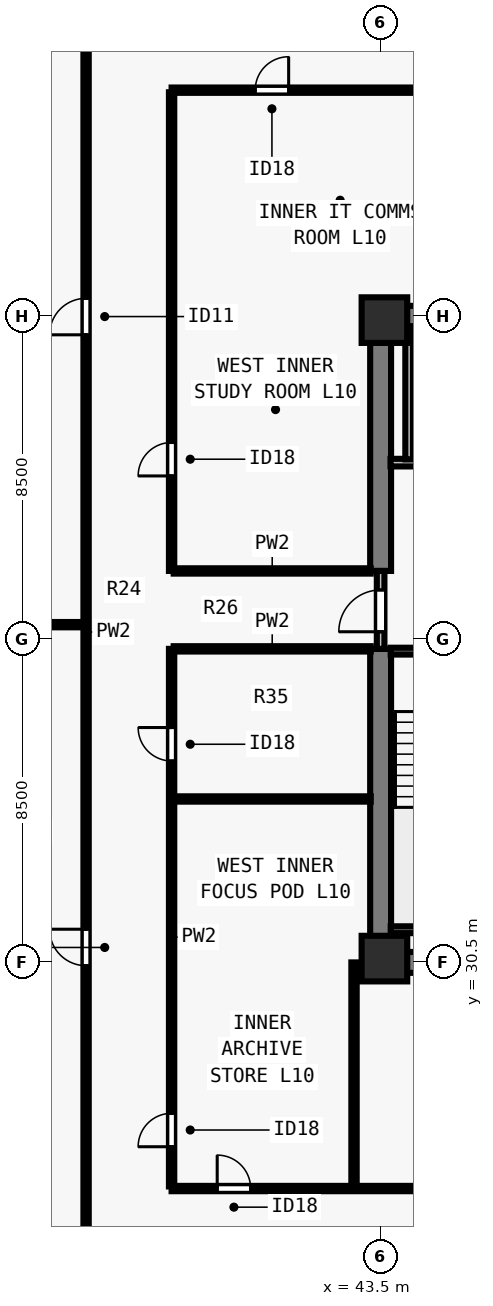
"""IFC4 building model, lengths in metres.
Left out: names, types, materials, properties, quantities, classifications, styles, units other than length and angle.
Written with IfcOpenShell. Run it as: python <this file> out.ifc"""

import sys

from ifc_helpers import new_model, si_unit, direction, frame, frame_2d, origin, origin_2d, place, context, subcontext, project, spatial, rectangle, extrude, element, fill, save


model = new_model("IFC4")
c1 = context("Model", 3, precision=1e-05, world=origin(), true_north=direction((0.0, 1.0)))
c2 = subcontext(c1, "Body", "Model", "MODEL_VIEW")
j1 = project(units=[si_unit("LENGTHUNIT", "METRE"), si_unit("PLANEANGLEUNIT", "RADIAN")], contexts=[c1])
p1 = place(None, origin())
s1 = spatial("IfcSite", under=j1, at=p1, CompositionType="ELEMENT")
p2 = place(p1, origin())
s2 = spatial("IfcBuilding", under=s1, at=p2, CompositionType="ELEMENT")
p3 = place(p2, frame((0.0, 0.0, 41.0)))
s3 = spatial("IfcBuildingStorey", under=s2, at=p3, CompositionType="ELEMENT", Elevation=41.0)
for number, where, z_axis, x_axis in (
    (1, (43.6, 30.6, 0.0), (0.0, 0.0, 1.0), (1.0, 0.0, 0.0)),
    (2, (43.6, 47.4, 0.0), (0.0, 0.0, 1.0), (1.0, 0.0, 0.0)),
):
    element("IfcColumn", number, at=place(p3, frame(where, z_axis=z_axis, x_axis=x_axis)), inside=s3, PredefinedType="COLUMN", context=c2, shape_type="SweptSolid", body=[
        extrude(rectangle(XDim=1.2, YDim=1.2, at=origin_2d()), origin(), (0.0, 0.0, 1.0), 3.5),
    ])
for number, where, z_axis, x_axis in (
    (3, (43.225, 30.5, 0.0), (0.0, 0.0, 1.0), (1.0, 0.0, 0.0)),
    (4, (43.225, 47.5, 0.0), (0.0, 0.0, 1.0), (1.0, 0.0, 0.0)),
):
    element("IfcWall", number, at=place(p3, frame(where, z_axis=z_axis, x_axis=x_axis)), inside=s3, PredefinedType="SHEAR", context=c2, shape_type="SweptSolid", body=[
        extrude(rectangle(XDim=17.55, YDim=0.55, at=frame_2d((8.775, 0.0))), origin(), (0.0, 0.0, 1.0), 3.28),
    ])
p4 = place(p3, frame((43.5, 30.765, 0.0), z_axis=(0.0, 0.0, 1.0), x_axis=(0.0, 1.0, 0.0)))
e5 = element("IfcWall", 5, at=p4, inside=s3, PredefinedType="SHEAR", context=c2, shape_type="SweptSolid", body=[
    extrude(rectangle(XDim=7.985, YDim=0.55, at=frame_2d((3.993, 0.0))), origin(), (0.0, 0.0, 1.0), 3.28),
])
p5 = place(p3, frame((43.5, 40.8, 0.0), z_axis=(0.0, 0.0, 1.0), x_axis=(0.0, 1.0, 0.0)))
e6 = element("IfcWall", 6, at=p5, inside=s3, PredefinedType="SHEAR", context=c2, shape_type="SweptSolid", body=[
    extrude(rectangle(XDim=6.435, YDim=0.55, at=frame_2d((3.218, 0.0))), origin(), (0.0, 0.0, 1.0), 3.28),
])
p6 = place(p3, frame((43.5, 38.75, 0.0), z_axis=(0.0, 0.0, 1.0), x_axis=(0.0, 1.0, 0.0)))
e7 = element("IfcWall", 7, at=p6, inside=s3, PredefinedType="SOLIDWALL", context=c2, shape_type="SweptSolid", body=[
    extrude(rectangle(XDim=2.05, YDim=0.2, at=frame_2d((1.025, 0.0))), origin(), (0.0, 0.0, 1.0), 3.28),
])
p7 = place(p6, frame((0.45, 0.0, 0.0)))
e8 = element("IfcOpeningElement", 8, at=p7, cuts=e7, PredefinedType="OPENING", context=c2, shape_type="SweptSolid", body=[
    extrude(rectangle(XDim=1.1, YDim=2.15, at=frame_2d((0.55, 1.075))), frame((0.0, 0.11, 0.0), z_axis=(0.0, -1.0, 0.0), x_axis=(1.0, 0.0, 0.0)), (0.0, 0.0, 1.0), 0.22),
])
p8 = place(p3, frame((43.76, 43.65, 0.0), z_axis=(0.0, 0.0, 1.0), x_axis=(1.0, 0.0, 0.0)))
e9 = element("IfcWall", 9, at=p8, inside=s3, PredefinedType="SOLIDWALL", context=c2, shape_type="SweptSolid", body=[
    extrude(rectangle(XDim=3.505, YDim=0.2, at=frame_2d((1.752, 0.0))), origin(), (0.0, 0.0, 1.0), 3.28),
])
p9 = place(p8, frame((1.11, 0.0, 0.0)))
e10 = element("IfcOpeningElement", 10, at=p9, cuts=e9, PredefinedType="OPENING", context=c2, shape_type="SweptSolid", body=[
    extrude(rectangle(XDim=1.1, YDim=2.2, at=frame_2d((0.55, 1.1))), frame((0.0, 0.11, 0.0), z_axis=(0.0, -1.0, 0.0), x_axis=(1.0, 0.0, 0.0)), (0.0, 0.0, 1.0), 0.22),
])
p10 = place(p3, frame((44.25, 43.735, 0.0), z_axis=(0.0, 0.0, 1.0), x_axis=(0.0, 1.0, 0.0)))
e11 = element("IfcWall", 11, at=p10, inside=s3, PredefinedType="SOLIDWALL", context=c2, shape_type="SweptSolid", body=[
    extrude(rectangle(XDim=3.505, YDim=0.2, at=frame_2d((1.752, 0.0))), origin(), (0.0, 0.0, 1.0), 3.28),
])
p11 = place(p3, frame((35.75, 22.355, 0.0), z_axis=(0.0, 0.0, 1.0), x_axis=(0.0, 1.0, 0.0)))
e12 = element("IfcWall", 12, at=p11, inside=s3, PredefinedType="PARTITIONING", context=c2, shape_type="SweptSolid", body=[
    extrude(rectangle(XDim=33.29, YDim=0.14, at=frame_2d((16.645, 0.0))), origin(), (0.0, 0.0, 1.0), 3.28),
])
p12 = place(p11, frame((8.058, 0.0, 0.0)))
e13 = element("IfcOpeningElement", 13, at=p12, cuts=e12, PredefinedType="OPENING", context=c2, shape_type="SweptSolid", body=[
    extrude(rectangle(XDim=0.96, YDim=2.12, at=frame_2d((0.48, 1.06))), frame((0.0, 0.08, 0.0), z_axis=(0.0, -1.0, 0.0), x_axis=(1.0, 0.0, 0.0)), (0.0, 0.0, 1.0), 0.16),
])
p13 = place(p11, frame((24.658, 0.0, 0.0)))
e14 = element("IfcOpeningElement", 14, at=p13, cuts=e12, PredefinedType="OPENING", context=c2, shape_type="SweptSolid", body=[
    extrude(rectangle(XDim=0.96, YDim=2.12, at=frame_2d((0.48, 1.06))), frame((0.0, 0.08, 0.0), z_axis=(0.0, -1.0, 0.0), x_axis=(1.0, 0.0, 0.0)), (0.0, 0.0, 1.0), 0.16),
])
p14 = place(p3, frame((38.0, 24.55, 0.0), z_axis=(0.0, 0.0, 1.0), x_axis=(1.0, 0.0, 0.0)))
e15 = element("IfcWall", 15, at=p14, inside=s3, PredefinedType="PARTITIONING", context=c2, shape_type="SweptSolid", body=[
    extrude(rectangle(XDim=28.0, YDim=0.14, at=frame_2d((14.0, 0.0))), origin(), (0.0, 0.0, 1.0), 3.28),
])
p15 = place(p14, frame((1.2, 0.0, 0.0)))
e16 = element("IfcOpeningElement", 16, at=p15, cuts=e15, PredefinedType="OPENING", context=c2, shape_type="SweptSolid", body=[
    extrude(rectangle(XDim=0.88, YDim=2.1, at=frame_2d((0.44, 1.05))), frame((0.0, 0.08, 0.0), z_axis=(0.0, -1.0, 0.0), x_axis=(1.0, 0.0, 0.0)), (0.0, 0.0, 1.0), 0.16),
])
p16 = place(p14, frame((10.5, 0.0, 0.0)))
e17 = element("IfcOpeningElement", 17, at=p16, cuts=e15, PredefinedType="OPENING", context=c2, shape_type="SweptSolid", body=[
    extrude(rectangle(XDim=0.88, YDim=2.1, at=frame_2d((0.44, 1.05))), frame((0.0, 0.08, 0.0), z_axis=(0.0, -1.0, 0.0), x_axis=(1.0, 0.0, 0.0)), (0.0, 0.0, 1.0), 0.16),
])
p17 = place(p14, frame((21.0, 0.0, 0.0)))
e18 = element("IfcOpeningElement", 18, at=p17, cuts=e15, PredefinedType="OPENING", context=c2, shape_type="SweptSolid", body=[
    extrude(rectangle(XDim=0.88, YDim=2.1, at=frame_2d((0.44, 1.05))), frame((0.0, 0.08, 0.0), z_axis=(0.0, -1.0, 0.0), x_axis=(1.0, 0.0, 0.0)), (0.0, 0.0, 1.0), 0.16),
])
p18 = place(p3, frame((38.0, 53.45, 0.0), z_axis=(0.0, 0.0, 1.0), x_axis=(1.0, 0.0, 0.0)))
e19 = element("IfcWall", 19, at=p18, inside=s3, PredefinedType="PARTITIONING", context=c2, shape_type="SweptSolid", body=[
    extrude(rectangle(XDim=28.0, YDim=0.14, at=frame_2d((14.0, 0.0))), origin(), (0.0, 0.0, 1.0), 3.28),
])
p19 = place(p18, frame((2.2, 0.0, 0.0)))
e20 = element("IfcOpeningElement", 20, at=p19, cuts=e19, PredefinedType="OPENING", context=c2, shape_type="SweptSolid", body=[
    extrude(rectangle(XDim=0.88, YDim=2.1, at=frame_2d((0.44, 1.05))), frame((0.0, 0.08, 0.0), z_axis=(0.0, -1.0, 0.0), x_axis=(1.0, 0.0, 0.0)), (0.0, 0.0, 1.0), 0.16),
])
p20 = place(p18, frame((14.5, 0.0, 0.0)))
e21 = element("IfcOpeningElement", 21, at=p20, cuts=e19, PredefinedType="OPENING", context=c2, shape_type="SweptSolid", body=[
    extrude(rectangle(XDim=0.88, YDim=2.1, at=frame_2d((0.44, 1.05))), frame((0.0, 0.08, 0.0), z_axis=(0.0, -1.0, 0.0), x_axis=(1.0, 0.0, 0.0)), (0.0, 0.0, 1.0), 0.16),
])
p21 = place(p18, frame((24.0, 0.0, 0.0)))
e22 = element("IfcOpeningElement", 22, at=p21, cuts=e19, PredefinedType="OPENING", context=c2, shape_type="SweptSolid", body=[
    extrude(rectangle(XDim=0.88, YDim=2.1, at=frame_2d((0.44, 1.05))), frame((0.0, 0.08, 0.0), z_axis=(0.0, -1.0, 0.0), x_axis=(1.0, 0.0, 0.0)), (0.0, 0.0, 1.0), 0.16),
])
p22 = place(p3, frame((38.0, 24.605, 0.0), z_axis=(0.0, 0.0, 1.0), x_axis=(0.0, 1.0, 0.0)))
e23 = element("IfcWall", 23, at=p22, inside=s3, PredefinedType="PARTITIONING", context=c2, shape_type="SweptSolid", body=[
    extrude(rectangle(XDim=14.145, YDim=0.14, at=frame_2d((7.073, 0.0))), origin(), (0.0, 0.0, 1.0), 3.28),
])
p23 = place(p22, frame((1.045, 0.0, 0.0)))
e24 = element("IfcOpeningElement", 24, at=p23, cuts=e23, PredefinedType="OPENING", context=c2, shape_type="SweptSolid", body=[
    extrude(rectangle(XDim=0.88, YDim=2.1, at=frame_2d((0.44, 1.05))), frame((0.0, 0.08, 0.0), z_axis=(0.0, -1.0, 0.0), x_axis=(1.0, 0.0, 0.0)), (0.0, 0.0, 1.0), 0.16),
])
p24 = place(p22, frame((11.195, 0.0, 0.0)))
e25 = element("IfcOpeningElement", 25, at=p24, cuts=e23, PredefinedType="OPENING", context=c2, shape_type="SweptSolid", body=[
    extrude(rectangle(XDim=0.88, YDim=2.1, at=frame_2d((0.44, 1.05))), frame((0.0, 0.08, 0.0), z_axis=(0.0, -1.0, 0.0), x_axis=(1.0, 0.0, 0.0)), (0.0, 0.0, 1.0), 0.16),
])
p25 = place(p3, frame((38.0, 40.8, 0.0), z_axis=(0.0, 0.0, 1.0), x_axis=(0.0, 1.0, 0.0)))
e26 = element("IfcWall", 26, at=p25, inside=s3, PredefinedType="PARTITIONING", context=c2, shape_type="SweptSolid", body=[
    extrude(rectangle(XDim=12.595, YDim=0.14, at=frame_2d((6.297, 0.0))), origin(), (0.0, 0.0, 1.0), 3.28),
])
p26 = place(p25, frame((2.5, 0.0, 0.0)))
e27 = element("IfcOpeningElement", 27, at=p26, cuts=e26, PredefinedType="OPENING", context=c2, shape_type="SweptSolid", body=[
    extrude(rectangle(XDim=0.88, YDim=2.1, at=frame_2d((0.44, 1.05))), frame((0.0, 0.08, 0.0), z_axis=(0.0, -1.0, 0.0), x_axis=(1.0, 0.0, 0.0)), (0.0, 0.0, 1.0), 0.16),
])
for number, where, z_axis, x_axis in (
    (28, (38.055, 38.75, 0.0), (0.0, 0.0, 1.0), (1.0, 0.0, 0.0)),
    (29, (38.055, 40.8, 0.0), (0.0, 0.0, 1.0), (1.0, 0.0, 0.0)),
):
    element("IfcWall", number, at=place(p3, frame(where, z_axis=z_axis, x_axis=x_axis)), inside=s3, PredefinedType="PARTITIONING", context=c2, shape_type="SweptSolid", body=[
        extrude(rectangle(XDim=5.185, YDim=0.14, at=frame_2d((2.593, 0.0))), origin(), (0.0, 0.0, 1.0), 3.28),
    ])
p27 = place(p3, frame((42.8, 24.605, 0.0), z_axis=(0.0, 0.0, 1.0), x_axis=(0.0, 1.0, 0.0)))
e30 = element("IfcWall", 30, at=p27, inside=s3, PredefinedType="PARTITIONING", context=c2, shape_type="SweptSolid", body=[
    extrude(rectangle(XDim=5.895, YDim=0.14, at=frame_2d((2.948, 0.0))), origin(), (0.0, 0.0, 1.0), 2.439),
])
p28 = place(p3, frame((38.055, 34.8, 0.0), z_axis=(0.0, 0.0, 1.0), x_axis=(1.0, 0.0, 0.0)))
e31 = element("IfcWall", 31, at=p28, inside=s3, PredefinedType="PARTITIONING", context=c2, shape_type="SweptSolid", body=[
    extrude(rectangle(XDim=5.185, YDim=0.14, at=frame_2d((2.593, 0.0))), origin(), (0.0, 0.0, 1.0), 3.28),
])
p29 = place(p3, frame((26.92, 39.387, 0.0), z_axis=(0.0, 0.0, 1.0), x_axis=(1.0, 0.0, 0.0)))
e32 = element("IfcWall", 32, at=p29, inside=s3, PredefinedType="PARTITIONING", context=c2, shape_type="SweptSolid", body=[
    extrude(rectangle(XDim=8.73, YDim=0.14, at=frame_2d((4.365, 0.0))), origin(), (0.0, 0.0, 1.0), 2.849),
])
p30 = place(p3, frame((43.765, 38.69, 0.0), z_axis=(0.0, 0.0, 1.0), x_axis=(1.0, 0.0, 0.0)))
e33 = element("IfcWall", 33, at=p30, inside=s3, PredefinedType="SOLIDWALL", context=c2, shape_type="SweptSolid", body=[
    extrude(rectangle(XDim=3.23, YDim=0.18, at=frame_2d((1.615, 0.0))), origin(), (0.0, 0.0, 1.0), 3.28),
])
p31 = place(p30, frame((1.14, 0.0, 0.0)))
e34 = element("IfcOpeningElement", 34, at=p31, cuts=e33, PredefinedType="OPENING", context=c2, shape_type="SweptSolid", body=[
    extrude(rectangle(XDim=0.95, YDim=2.15, at=frame_2d((0.475, 1.075))), frame((0.0, 0.1, 0.0), z_axis=(0.0, -1.0, 0.0), x_axis=(1.0, 0.0, 0.0)), (0.0, 0.0, 1.0), 0.2),
])
p32 = place(p3, frame((43.765, 31.36, 0.0), z_axis=(0.0, 0.0, 1.0), x_axis=(1.0, 0.0, 0.0)))
e35 = element("IfcWall", 35, at=p32, inside=s3, PredefinedType="SOLIDWALL", context=c2, shape_type="SweptSolid", body=[
    extrude(rectangle(XDim=3.23, YDim=0.18, at=frame_2d((1.615, 0.0))), origin(), (0.0, 0.0, 1.0), 3.28),
])
p33 = place(p7, origin())
e36 = element("IfcDoor", 36, at=p33, inside=s3, OperationType="SINGLE_SWING_LEFT", PredefinedType="DOOR", context=c2, shape_type="SweptSolid", body=[
    extrude(rectangle(XDim=1.1, YDim=2.15, at=frame_2d((0.55, 1.075))), frame((0.0, 0.025, 0.0), z_axis=(0.0, -1.0, 0.0), x_axis=(1.0, 0.0, 0.0)), (0.0, 0.0, 1.0), 0.05),
])
fill(e8, e36)
p34 = place(p15, origin())
e37 = element("IfcDoor", 37, at=p34, inside=s3, OperationType="SINGLE_SWING_LEFT", PredefinedType="DOOR", context=c2, shape_type="SweptSolid", body=[
    extrude(rectangle(XDim=0.88, YDim=2.1, at=frame_2d((0.44, 1.05))), frame((0.0, 0.025, 0.0), z_axis=(0.0, -1.0, 0.0), x_axis=(1.0, 0.0, 0.0)), (0.0, 0.0, 1.0), 0.05),
])
fill(e16, e37)
p35 = place(p19, origin())
e38 = element("IfcDoor", 38, at=p35, inside=s3, OperationType="SINGLE_SWING_RIGHT", PredefinedType="DOOR", context=c2, shape_type="SweptSolid", body=[
    extrude(rectangle(XDim=0.88, YDim=2.1, at=frame_2d((0.44, 1.05))), frame((0.0, 0.025, 0.0), z_axis=(0.0, -1.0, 0.0), x_axis=(1.0, 0.0, 0.0)), (0.0, 0.0, 1.0), 0.05),
])
fill(e20, e38)
p36 = place(p23, origin())
e39 = element("IfcDoor", 39, at=p36, inside=s3, OperationType="SINGLE_SWING_LEFT", PredefinedType="DOOR", context=c2, shape_type="SweptSolid", body=[
    extrude(rectangle(XDim=0.88, YDim=2.1, at=frame_2d((0.44, 1.05))), frame((0.0, 0.025, 0.0), z_axis=(0.0, -1.0, 0.0), x_axis=(1.0, 0.0, 0.0)), (0.0, 0.0, 1.0), 0.05),
])
fill(e24, e39)
p37 = place(p24, origin())
e40 = element("IfcDoor", 40, at=p37, inside=s3, OperationType="SINGLE_SWING_RIGHT", PredefinedType="DOOR", context=c2, shape_type="SweptSolid", body=[
    extrude(rectangle(XDim=0.88, YDim=2.1, at=frame_2d((0.44, 1.05))), frame((0.0, 0.025, 0.0), z_axis=(0.0, -1.0, 0.0), x_axis=(1.0, 0.0, 0.0)), (0.0, 0.0, 1.0), 0.05),
])
fill(e25, e40)
p38 = place(p26, origin())
e41 = element("IfcDoor", 41, at=p38, inside=s3, OperationType="SINGLE_SWING_LEFT", PredefinedType="DOOR", context=c2, shape_type="SweptSolid", body=[
    extrude(rectangle(XDim=0.88, YDim=2.1, at=frame_2d((0.44, 1.05))), frame((0.0, 0.025, 0.0), z_axis=(0.0, -1.0, 0.0), x_axis=(1.0, 0.0, 0.0)), (0.0, 0.0, 1.0), 0.05),
])
fill(e27, e41)
p39 = place(p12, origin())
e42 = element("IfcDoor", 42, at=p39, inside=s3, OperationType="SINGLE_SWING_RIGHT", PredefinedType="DOOR", context=c2, shape_type="SweptSolid", body=[
    extrude(rectangle(XDim=0.96, YDim=2.12, at=frame_2d((0.48, 1.06))), frame((0.0, 0.025, 0.0), z_axis=(0.0, -1.0, 0.0), x_axis=(1.0, 0.0, 0.0)), (0.0, 0.0, 1.0), 0.05),
])
fill(e13, e42)
p40 = place(p13, origin())
e43 = element("IfcDoor", 43, at=p40, inside=s3, OperationType="SINGLE_SWING_LEFT", PredefinedType="DOOR", context=c2, shape_type="SweptSolid", body=[
    extrude(rectangle(XDim=0.96, YDim=2.12, at=frame_2d((0.48, 1.06))), frame((0.0, 0.025, 0.0), z_axis=(0.0, -1.0, 0.0), x_axis=(1.0, 0.0, 0.0)), (0.0, 0.0, 1.0), 0.05),
])
fill(e14, e43)
save(model, sys.argv[1])
